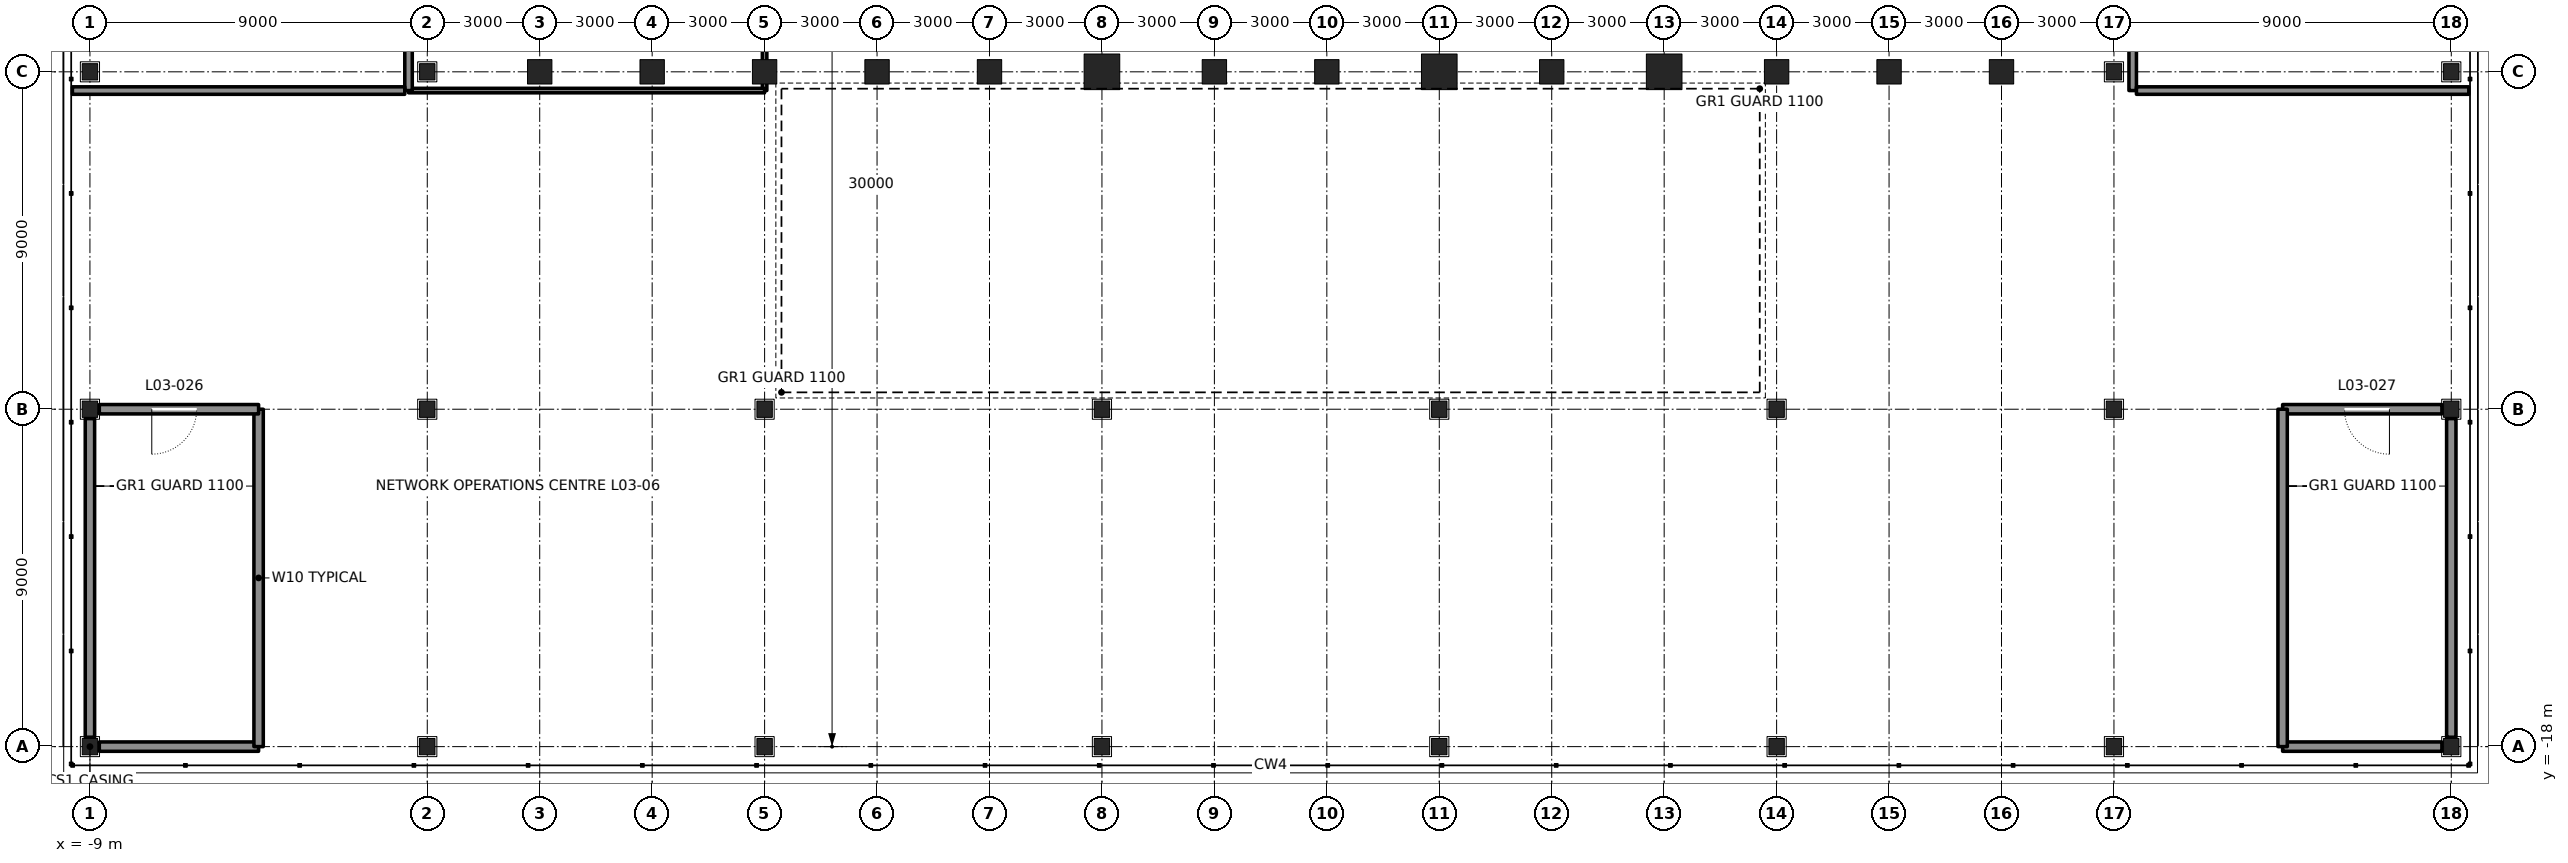
"""IFC4 building model, lengths in metres.
Left out: names, types, materials, properties, quantities, classifications, styles, units other than length and angle.
Written with IfcOpenShell. Run it as: python <this file> out.ifc"""

import sys

from ifc_helpers import new_model, si_unit, direction, frame, frame_2d, origin, origin_2d, place, context, subcontext, project, spatial, rectangle, hollow_rectangle, i_section, extrude, element, fill, save


model = new_model("IFC4")
c1 = context("Model", 3, precision=1e-05, world=origin(), true_north=direction((0.0, 1.0)))
c2 = subcontext(c1, "Body", "Model", "MODEL_VIEW")
j1 = project(units=[si_unit("LENGTHUNIT", "METRE"), si_unit("PLANEANGLEUNIT", "RADIAN")], contexts=[c1])
p1 = place(None, origin())
s1 = spatial("IfcSite", under=j1, at=p1, CompositionType="ELEMENT")
p2 = place(p1, origin())
s2 = spatial("IfcBuilding", under=s1, at=p2, CompositionType="ELEMENT")
p3 = place(p2, frame((0.0, 0.0, 19.5)))
s3 = spatial("IfcBuildingStorey", under=s2, at=p3, CompositionType="ELEMENT", Elevation=19.5)
for number, where, z_axis, x_axis in (
    (1, (3.0, 0.0, 0.0), (0.0, 0.0, 1.0), (0.0, -1.0, 0.0)),
    (2, (6.0, 0.0, 0.0), (0.0, 0.0, 1.0), (0.0, -1.0, 0.0)),
    (3, (9.0, 0.0, 0.0), (0.0, 0.0, 1.0), (0.0, -1.0, 0.0)),
    (4, (12.0, 0.0, 0.0), (0.0, 0.0, 1.0), (0.0, -1.0, 0.0)),
    (5, (15.0, 0.0, 0.0), (0.0, 0.0, 1.0), (0.0, -1.0, 0.0)),
):
    element("IfcColumn", number, at=place(p3, frame(where, z_axis=z_axis, x_axis=x_axis)), inside=s3, PredefinedType="COLUMN", context=c2, shape_type="SweptSolid", body=[
        extrude(hollow_rectangle(XDim=0.65, YDim=0.65, WallThickness=0.065, at=origin_2d()), origin(), (0.0, 0.0, 1.0), 4.8),
    ])
p4 = place(p3, frame((18.0, 0.0, 0.0), z_axis=(0.0, 0.0, 1.0), x_axis=(0.0, -1.0, 0.0)))
e6 = element("IfcColumn", 6, at=p4, inside=s3, PredefinedType="COLUMN", context=c2, shape_type="SweptSolid", body=[
    extrude(hollow_rectangle(XDim=0.95, YDim=0.95, WallThickness=0.11, at=origin_2d()), origin(), (0.0, 0.0, 1.0), 4.8),
])
for number, where, z_axis, x_axis in (
    (7, (21.0, 0.0, 0.0), (0.0, 0.0, 1.0), (0.0, -1.0, 0.0)),
    (8, (24.0, 0.0, 0.0), (0.0, 0.0, 1.0), (0.0, -1.0, 0.0)),
):
    element("IfcColumn", number, at=place(p3, frame(where, z_axis=z_axis, x_axis=x_axis)), inside=s3, PredefinedType="COLUMN", context=c2, shape_type="SweptSolid", body=[
        extrude(hollow_rectangle(XDim=0.65, YDim=0.65, WallThickness=0.065, at=origin_2d()), origin(), (0.0, 0.0, 1.0), 4.8),
    ])
p5 = place(p3, frame((27.0, 0.0, 0.0), z_axis=(0.0, 0.0, 1.0), x_axis=(0.0, -1.0, 0.0)))
e9 = element("IfcColumn", 9, at=p5, inside=s3, PredefinedType="COLUMN", context=c2, shape_type="SweptSolid", body=[
    extrude(hollow_rectangle(XDim=0.95, YDim=0.95, WallThickness=0.11, at=origin_2d()), origin(), (0.0, 0.0, 1.0), 4.8),
])
p6 = place(p3, frame((30.0, 0.0, 0.0), z_axis=(0.0, 0.0, 1.0), x_axis=(0.0, -1.0, 0.0)))
e10 = element("IfcColumn", 10, at=p6, inside=s3, PredefinedType="COLUMN", context=c2, shape_type="SweptSolid", body=[
    extrude(hollow_rectangle(XDim=0.65, YDim=0.65, WallThickness=0.065, at=origin_2d()), origin(), (0.0, 0.0, 1.0), 4.8),
])
p7 = place(p3, frame((33.0, 0.0, 0.0), z_axis=(0.0, 0.0, 1.0), x_axis=(0.0, -1.0, 0.0)))
e11 = element("IfcColumn", 11, at=p7, inside=s3, PredefinedType="COLUMN", context=c2, shape_type="SweptSolid", body=[
    extrude(hollow_rectangle(XDim=0.95, YDim=0.95, WallThickness=0.11, at=origin_2d()), origin(), (0.0, 0.0, 1.0), 4.8),
])
for number, where, z_axis, x_axis in (
    (12, (36.0, 0.0, 0.0), (0.0, 0.0, 1.0), (0.0, -1.0, 0.0)),
    (13, (39.0, 0.0, 0.0), (0.0, 0.0, 1.0), (0.0, -1.0, 0.0)),
    (14, (42.0, 0.0, 0.0), (0.0, 0.0, 1.0), (0.0, -1.0, 0.0)),
):
    element("IfcColumn", number, at=place(p3, frame(where, z_axis=z_axis, x_axis=x_axis)), inside=s3, PredefinedType="COLUMN", context=c2, shape_type="SweptSolid", body=[
        extrude(hollow_rectangle(XDim=0.65, YDim=0.65, WallThickness=0.065, at=origin_2d()), origin(), (0.0, 0.0, 1.0), 4.8),
    ])
for number, where, z_axis, x_axis in (
    (15, (-9.0, -18.0, 0.0), (0.0, 0.0, 1.0), (1.0, 0.0, 0.0)),
    (16, (-9.0, -9.0, 0.0), (0.0, 0.0, 1.0), (1.0, 0.0, 0.0)),
    (17, (-9.0, 0.0, 0.0), (0.0, 0.0, 1.0), (1.0, 0.0, 0.0)),
    (18, (0.0, -18.0, 0.0), (0.0, 0.0, 1.0), (1.0, 0.0, 0.0)),
    (19, (0.0, -9.0, 0.0), (0.0, 0.0, 1.0), (1.0, 0.0, 0.0)),
    (20, (0.0, 0.0, 0.0), (0.0, 0.0, 1.0), (1.0, 0.0, 0.0)),
    (21, (9.0, -18.0, 0.0), (0.0, 0.0, 1.0), (1.0, 0.0, 0.0)),
    (22, (9.0, -9.0, 0.0), (0.0, 0.0, 1.0), (1.0, 0.0, 0.0)),
    (23, (18.0, -18.0, 0.0), (0.0, 0.0, 1.0), (1.0, 0.0, 0.0)),
    (24, (18.0, -9.0, 0.0), (0.0, 0.0, 1.0), (1.0, 0.0, 0.0)),
    (25, (27.0, -18.0, 0.0), (0.0, 0.0, 1.0), (1.0, 0.0, 0.0)),
    (26, (27.0, -9.0, 0.0), (0.0, 0.0, 1.0), (1.0, 0.0, 0.0)),
    (27, (36.0, -18.0, 0.0), (0.0, 0.0, 1.0), (1.0, 0.0, 0.0)),
    (28, (36.0, -9.0, 0.0), (0.0, 0.0, 1.0), (1.0, 0.0, 0.0)),
    (29, (45.0, -18.0, 0.0), (0.0, 0.0, 1.0), (1.0, 0.0, 0.0)),
    (30, (45.0, -9.0, 0.0), (0.0, 0.0, 1.0), (1.0, 0.0, 0.0)),
    (31, (45.0, 0.0, 0.0), (0.0, 0.0, 1.0), (1.0, 0.0, 0.0)),
    (32, (54.0, -18.0, 0.0), (0.0, 0.0, 1.0), (1.0, 0.0, 0.0)),
    (33, (54.0, -9.0, 0.0), (0.0, 0.0, 1.0), (1.0, 0.0, 0.0)),
    (34, (54.0, 0.0, 0.0), (0.0, 0.0, 1.0), (1.0, 0.0, 0.0)),
):
    element("IfcColumn", number, at=place(p3, frame(where, z_axis=z_axis, x_axis=x_axis)), inside=s3, PredefinedType="COLUMN", context=c2, shape_type="SweptSolid", body=[
        extrude(i_section(OverallWidth=0.411, OverallDepth=0.434, WebThickness=0.036, FlangeThickness=0.057, at=origin_2d()), origin(), (0.0, 0.0, 1.0), 4.8),
    ])
p8 = place(p3, frame((9.0, -0.5, 0.0), z_axis=(0.0, 0.0, 1.0), x_axis=(0.0, 1.0, 0.0)))
e35 = element("IfcWall", 35, at=p8, inside=s3, PredefinedType="PARTITIONING", context=c2, shape_type="SweptSolid", body=[
    extrude(rectangle(XDim=35.3, YDim=0.12, at=frame_2d((17.65, 0.0))), origin(), (0.0, 0.0, 1.0), 3.653),
])
p9 = place(p8, frame((17.15, 0.0, 0.0)))
e36 = element("IfcOpeningElement", 36, at=p9, cuts=e35, PredefinedType="OPENING", context=c2, shape_type="SweptSolid", body=[
    extrude(rectangle(XDim=1.0, YDim=2.4, at=frame_2d((0.5, 1.2))), frame((0.0, 0.07, 0.0), z_axis=(0.0, -1.0, 0.0), x_axis=(1.0, 0.0, 0.0)), (0.0, 0.0, 1.0), 0.14),
])
p10 = place(p3, frame((-0.5, -0.5, 0.0), z_axis=(0.0, 0.0, 1.0), x_axis=(1.0, 0.0, 0.0)))
e37 = element("IfcWall", 37, at=p10, inside=s3, PredefinedType="PARTITIONING", context=c2, shape_type="SweptSolid", body=[
    extrude(rectangle(XDim=9.5, YDim=0.12, at=frame_2d((4.75, 0.0))), origin(), (0.0, 0.0, 1.0), 4.34),
])
p11 = place(p3, frame((-0.5, -0.5, 0.0), z_axis=(0.0, 0.0, 1.0), x_axis=(0.0, 1.0, 0.0)))
e38 = element("IfcWall", 38, at=p11, inside=s3, PredefinedType="PARTITIONING", context=c2, shape_type="SweptSolid", body=[
    extrude(rectangle(XDim=46.018, YDim=0.2, at=frame_2d((23.009, 0.0))), origin(), (0.0, 0.0, 1.0), 4.64),
])
p12 = place(p11, frame((13.1, 0.0, 0.0)))
e39 = element("IfcOpeningElement", 39, at=p12, cuts=e38, PredefinedType="OPENING", context=c2, shape_type="SweptSolid", body=[
    extrude(rectangle(XDim=1.8, YDim=2.4, at=frame_2d((0.9, 1.2))), frame((0.0, 0.11, 0.0), z_axis=(0.0, -1.0, 0.0), x_axis=(1.0, 0.0, 0.0)), (0.0, 0.0, 1.0), 0.22),
])
p13 = place(p3, frame((45.5, -0.5, 0.0), z_axis=(0.0, 0.0, 1.0), x_axis=(0.0, 1.0, 0.0)))
e40 = element("IfcWall", 40, at=p13, inside=s3, PredefinedType="PARTITIONING", context=c2, shape_type="SweptSolid", body=[
    extrude(rectangle(XDim=46.018, YDim=0.2, at=frame_2d((23.009, 0.0))), origin(), (0.0, 0.0, 1.0), 4.64),
])
p14 = place(p13, frame((43.625, 0.0, 0.0)))
e41 = element("IfcOpeningElement", 41, at=p14, cuts=e40, PredefinedType="OPENING", context=c2, shape_type="SweptSolid", body=[
    extrude(rectangle(XDim=0.75, YDim=2.1, at=frame_2d((0.375, 1.05))), frame((0.0, 0.11, 0.0), z_axis=(0.0, -1.0, 0.0), x_axis=(1.0, 0.0, 0.0)), (0.0, 0.0, 1.0), 0.22),
])
p15 = place(p13, frame((10.1, 0.0, 0.0)))
e42 = element("IfcOpeningElement", 42, at=p15, cuts=e40, PredefinedType="OPENING", context=c2, shape_type="SweptSolid", body=[
    extrude(rectangle(XDim=1.8, YDim=2.4, at=frame_2d((0.9, 1.2))), frame((0.0, 0.11, 0.0), z_axis=(0.0, -1.0, 0.0), x_axis=(1.0, 0.0, 0.0)), (0.0, 0.0, 1.0), 0.22),
])
for number, where, z_axis, x_axis in (
    (43, (-9.468, -0.5, 0.0), (0.0, 0.0, 1.0), (1.0, 0.0, 0.0)),
    (44, (45.6, -0.5, 0.0), (0.0, 0.0, 1.0), (1.0, 0.0, 0.0)),
):
    element("IfcWall", number, at=place(p3, frame(where, z_axis=z_axis, x_axis=x_axis)), inside=s3, PredefinedType="PARTITIONING", context=c2, shape_type="SweptSolid", body=[
        extrude(rectangle(XDim=8.868, YDim=0.2, at=frame_2d((4.434, 0.0))), origin(), (0.0, 0.0, 1.0), 4.64),
    ])
p16 = place(p3, frame((-8.75, -18.0, 0.0), z_axis=(0.0, 0.0, 1.0), x_axis=(1.0, 0.0, 0.0)))
e45 = element("IfcWall", 45, at=p16, inside=s3, PredefinedType="SOLIDWALL", context=c2, shape_type="SweptSolid", body=[
    extrude(rectangle(XDim=4.25, YDim=0.25, at=frame_2d((2.125, 0.0))), origin(), (0.0, 0.0, 1.0), 3.653),
])
p17 = place(p3, frame((-4.5, -18.0, 0.0), z_axis=(0.0, 0.0, 1.0), x_axis=(0.0, 1.0, 0.0)))
e46 = element("IfcWall", 46, at=p17, inside=s3, PredefinedType="SOLIDWALL", context=c2, shape_type="SweptSolid", body=[
    extrude(rectangle(XDim=9.0, YDim=0.25, at=frame_2d((4.5, 0.0))), origin(), (0.0, 0.0, 1.0), 4.64),
])
p18 = place(p3, frame((-8.75, -9.0, 0.0), z_axis=(0.0, 0.0, 1.0), x_axis=(1.0, 0.0, 0.0)))
e47 = element("IfcWall", 47, at=p18, inside=s3, PredefinedType="SOLIDWALL", context=c2, shape_type="SweptSolid", body=[
    extrude(rectangle(XDim=4.25, YDim=0.25, at=frame_2d((2.125, 0.0))), origin(), (0.0, 0.0, 1.0), 3.653),
])
p19 = place(p18, frame((1.4, 0.0, 0.0)))
e48 = element("IfcOpeningElement", 48, at=p19, cuts=e47, PredefinedType="OPENING", context=c2, shape_type="SweptSolid", body=[
    extrude(rectangle(XDim=1.2, YDim=2.1, at=frame_2d((0.6, 1.05))), frame((0.0, 0.135, 0.0), z_axis=(0.0, -1.0, 0.0), x_axis=(1.0, 0.0, 0.0)), (0.0, 0.0, 1.0), 0.27),
])
p20 = place(p3, frame((-9.0, -17.75, 0.0), z_axis=(0.0, 0.0, 1.0), x_axis=(0.0, 1.0, 0.0)))
e49 = element("IfcWall", 49, at=p20, inside=s3, PredefinedType="SOLIDWALL", context=c2, shape_type="SweptSolid", body=[
    extrude(rectangle(XDim=8.5, YDim=0.25, at=frame_2d((4.25, 0.0))), origin(), (0.0, 0.0, 1.0), 3.653),
])
p21 = place(p3, frame((49.5, -18.0, 0.0), z_axis=(0.0, 0.0, 1.0), x_axis=(1.0, 0.0, 0.0)))
e50 = element("IfcWall", 50, at=p21, inside=s3, PredefinedType="SOLIDWALL", context=c2, shape_type="SweptSolid", body=[
    extrude(rectangle(XDim=4.25, YDim=0.25, at=frame_2d((2.125, 0.0))), origin(), (0.0, 0.0, 1.0), 3.653),
])
p22 = place(p3, frame((54.0, -17.75, 0.0), z_axis=(0.0, 0.0, 1.0), x_axis=(0.0, 1.0, 0.0)))
e51 = element("IfcWall", 51, at=p22, inside=s3, PredefinedType="SOLIDWALL", context=c2, shape_type="SweptSolid", body=[
    extrude(rectangle(XDim=8.5, YDim=0.25, at=frame_2d((4.25, 0.0))), origin(), (0.0, 0.0, 1.0), 3.653),
])
p23 = place(p3, frame((49.5, -9.0, 0.0), z_axis=(0.0, 0.0, 1.0), x_axis=(1.0, 0.0, 0.0)))
e52 = element("IfcWall", 52, at=p23, inside=s3, PredefinedType="SOLIDWALL", context=c2, shape_type="SweptSolid", body=[
    extrude(rectangle(XDim=4.25, YDim=0.25, at=frame_2d((2.125, 0.0))), origin(), (0.0, 0.0, 1.0), 3.653),
])
p24 = place(p23, frame((1.65, 0.0, 0.0)))
e53 = element("IfcOpeningElement", 53, at=p24, cuts=e52, PredefinedType="OPENING", context=c2, shape_type="SweptSolid", body=[
    extrude(rectangle(XDim=1.2, YDim=2.1, at=frame_2d((0.6, 1.05))), frame((0.0, 0.135, 0.0), z_axis=(0.0, -1.0, 0.0), x_axis=(1.0, 0.0, 0.0)), (0.0, 0.0, 1.0), 0.27),
])
p25 = place(p3, frame((49.5, -18.0, 0.0), z_axis=(0.0, 0.0, 1.0), x_axis=(0.0, 1.0, 0.0)))
e54 = element("IfcWall", 54, at=p25, inside=s3, PredefinedType="SOLIDWALL", context=c2, shape_type="SweptSolid", body=[
    extrude(rectangle(XDim=9.0, YDim=0.25, at=frame_2d((4.5, 0.0))), origin(), (0.0, 0.0, 1.0), 4.64),
])
p26 = place(p19, frame((1.2, 0.0, 0.0), z_axis=(0.0, 0.0, 1.0), x_axis=(-1.0, 0.0, 0.0)))
e55 = element("IfcDoor", 55, at=p26, inside=s3, OperationType="SINGLE_SWING_RIGHT", PredefinedType="DOOR", context=c2, shape_type="SweptSolid", body=[
    extrude(rectangle(XDim=1.2, YDim=2.1, at=frame_2d((0.6, 1.05))), frame((0.0, 0.025, 0.0), z_axis=(0.0, -1.0, 0.0), x_axis=(1.0, 0.0, 0.0)), (0.0, 0.0, 1.0), 0.05),
])
fill(e48, e55)
p27 = place(p24, frame((1.2, 0.0, 0.0), z_axis=(0.0, 0.0, 1.0), x_axis=(-1.0, 0.0, 0.0)))
e56 = element("IfcDoor", 56, at=p27, inside=s3, OperationType="SINGLE_SWING_LEFT", PredefinedType="DOOR", context=c2, shape_type="SweptSolid", body=[
    extrude(rectangle(XDim=1.2, YDim=2.1, at=frame_2d((0.6, 1.05))), frame((0.0, 0.025, 0.0), z_axis=(0.0, -1.0, 0.0), x_axis=(1.0, 0.0, 0.0)), (0.0, 0.0, 1.0), 0.05),
])
fill(e53, e56)
save(model, sys.argv[1])
